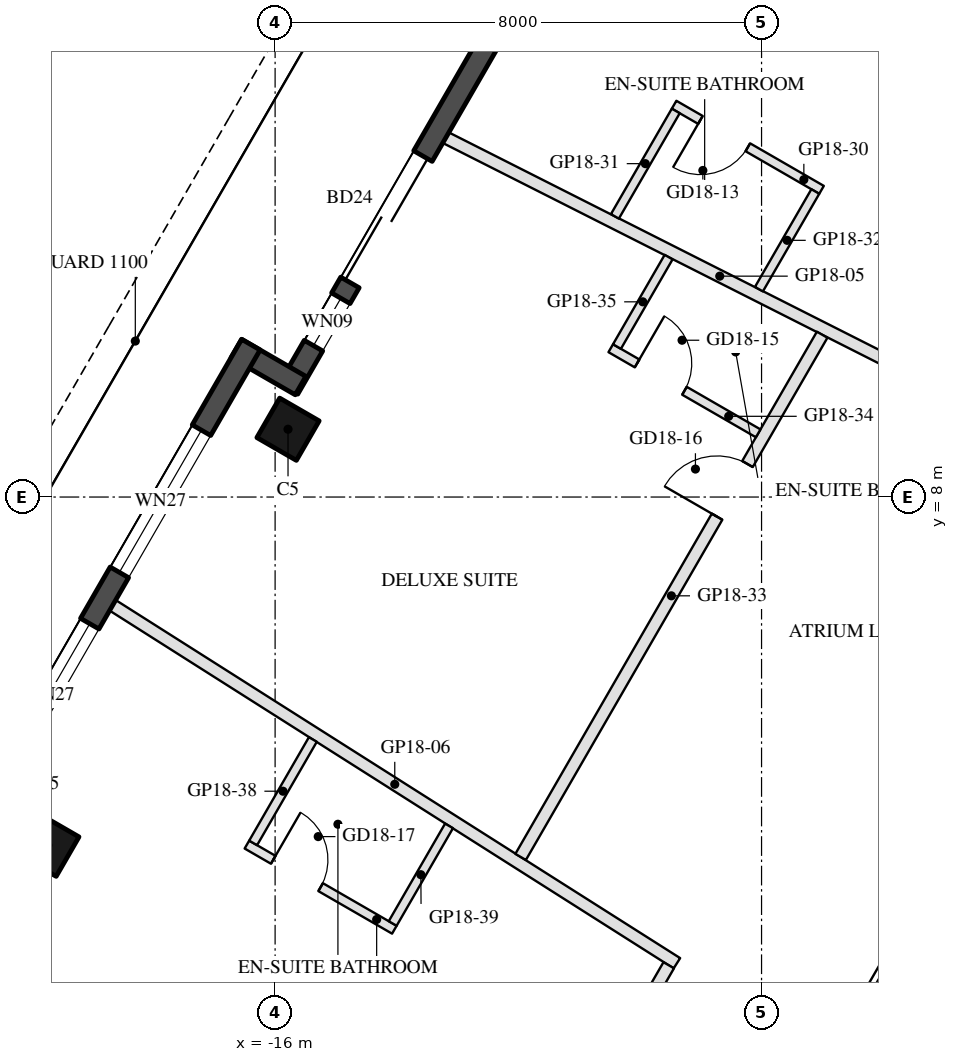
"""IFC4 building model, lengths in metres.
Left out: names, types, materials, properties, quantities, classifications, styles, units other than length and angle.
Written with IfcOpenShell. Run it as: python <this file> out.ifc"""

import sys

from ifc_helpers import new_model, si_unit, direction, frame, frame_2d, origin, origin_2d, place, context, subcontext, project, spatial, rectangle, hollow_rectangle, extrude, element, fill, save


model = new_model("IFC4")
c1 = context("Model", 3, precision=1e-05, world=origin(), true_north=direction((0.0, 1.0)))
c2 = subcontext(c1, "Body", "Model", "MODEL_VIEW")
j1 = project(units=[si_unit("LENGTHUNIT", "METRE"), si_unit("PLANEANGLEUNIT", "RADIAN")], contexts=[c1])
p1 = place(None, origin())
s1 = spatial("IfcSite", under=j1, at=p1, CompositionType="ELEMENT")
p2 = place(p1, origin())
s2 = spatial("IfcBuilding", under=s1, at=p2, CompositionType="ELEMENT")
p3 = place(p2, frame((0.0, 0.0, 191.0)))
s3 = spatial("IfcBuildingStorey", under=s2, at=p3, CompositionType="ELEMENT", Elevation=191.0)
for number, where, z_axis, x_axis in (
    (1, (-15.788, 9.115, 0.0), (0.0, 0.0, 1.0), (0.5, 0.866, 0.0)),
    (2, (-19.738, 2.273, 0.0), (0.0, 0.0, 1.0), (0.5, 0.866, 0.0)),
):
    element("IfcColumn", number, at=place(p3, frame(where, z_axis=z_axis, x_axis=x_axis)), inside=s3, PredefinedType="COLUMN", context=c2, shape_type="SweptSolid", body=[
        extrude(hollow_rectangle(XDim=0.75, YDim=0.75, WallThickness=0.035, at=origin_2d()), origin(), (0.0, 0.0, 1.0), 3.7),
    ])
p4 = place(p3, frame((-13.413, 16.029, 0.0), z_axis=(0.0, 0.0, 1.0), x_axis=(0.866005645448, -0.500034220881, 0.0)))
e3 = element("IfcWall", 3, at=p4, inside=s3, PredefinedType="SOLIDWALL", context=c2, shape_type="SweptSolid", body=[
    extrude(rectangle(XDim=1.22, YDim=0.35, at=frame_2d((0.61, 0.0))), origin(), (0.0, 0.0, 1.0), 3.55),
])
p5 = place(p3, frame((-12.409, 15.617, 0.0), z_axis=(0.0, 0.0, 1.0), x_axis=(-0.500003597184, -0.866023326939, 0.0)))
e4 = element("IfcWall", 4, at=p5, inside=s3, PredefinedType="SOLIDWALL", context=c2, shape_type="SweptSolid", body=[
    extrude(rectangle(XDim=6.74, YDim=0.35, at=frame_2d((3.37, 0.0))), origin(), (0.0, 0.0, 1.0), 3.55),
])
p6 = place(p5, frame((2.32, 0.0, 0.0)))
e5 = element("IfcOpeningElement", 5, at=p6, cuts=e4, PredefinedType="OPENING", context=c2, shape_type="SweptSolid", body=[
    extrude(rectangle(XDim=2.4, YDim=2.4, at=frame_2d((1.2, 1.2))), frame((0.0, 0.185, 0.0), z_axis=(0.0, -1.0, 0.0), x_axis=(1.0, 0.0, 0.0)), (0.0, 0.0, 1.0), 0.37),
])
p7 = place(p5, frame((5.02, 0.0, 0.3)))
e6 = element("IfcOpeningElement", 6, at=p7, cuts=e4, PredefinedType="OPENING", context=c2, shape_type="SweptSolid", body=[
    extrude(rectangle(XDim=0.9, YDim=2.65, at=frame_2d((0.45, 1.325))), frame((0.0, 0.185, 0.0), z_axis=(0.0, -1.0, 0.0), x_axis=(1.0, 0.0, 0.0)), (0.0, 0.0, 1.0), 0.37),
])
p8 = place(p3, frame((-15.581, 9.833, 0.0), z_axis=(0.0, 0.0, 1.0), x_axis=(-0.866055662726, 0.499947586314, 0.0)))
e7 = element("IfcWall", 7, at=p8, inside=s3, PredefinedType="SOLIDWALL", context=c2, shape_type="SweptSolid", body=[
    extrude(rectangle(XDim=1.22, YDim=0.35, at=frame_2d((0.61, 0.0))), origin(), (0.0, 0.0, 1.0), 3.55),
])
p9 = place(p3, frame((-16.398, 10.507, 0.0), z_axis=(0.0, 0.0, 1.0), x_axis=(-0.499999142773, -0.866025898704, 0.0)))
e8 = element("IfcWall", 8, at=p9, inside=s3, PredefinedType="SOLIDWALL", context=c2, shape_type="SweptSolid", body=[
    extrude(rectangle(XDim=9.7, YDim=0.35, at=frame_2d((4.85, 0.0))), origin(), (0.0, 0.0, 1.0), 3.55),
])
p10 = place(p9, frame((1.625, 0.0, 0.3)))
e9 = element("IfcOpeningElement", 9, at=p10, cuts=e8, PredefinedType="OPENING", context=c2, shape_type="SweptSolid", body=[
    extrude(rectangle(XDim=2.7, YDim=2.65, at=frame_2d((1.35, 1.325))), frame((0.0, 0.185, 0.0), z_axis=(0.0, -1.0, 0.0), x_axis=(1.0, 0.0, 0.0)), (0.0, 0.0, 1.0), 0.37),
])
p11 = place(p9, frame((5.3, 0.0, 0.3)))
e10 = element("IfcOpeningElement", 10, at=p11, cuts=e8, PredefinedType="OPENING", context=c2, shape_type="SweptSolid", body=[
    extrude(rectangle(XDim=2.7, YDim=2.65, at=frame_2d((1.35, 1.325))), frame((0.0, 0.185, 0.0), z_axis=(0.0, -1.0, 0.0), x_axis=(1.0, 0.0, 0.0)), (0.0, 0.0, 1.0), 0.37),
])
p12 = place(p3, frame((-13.192, 13.91, 0.0), z_axis=(0.0, 0.0, 1.0), x_axis=(0.892469554868, -0.451107629766, 0.0)))
e11 = element("IfcWall", 11, at=p12, inside=s3, PredefinedType="PARTITIONING", context=c2, shape_type="SweptSolid", body=[
    extrude(rectangle(XDim=10.096, YDim=0.2, at=frame_2d((5.048, 0.0))), origin(), (0.0, 0.0, 1.0), 3.06),
])
p13 = place(p3, frame((-18.672, 6.219, 0.0), z_axis=(0.0, 0.0, 1.0), x_axis=(0.844423533478, -0.535676111198, 0.0)))
e12 = element("IfcWall", 12, at=p13, inside=s3, PredefinedType="PARTITIONING", context=c2, shape_type="SweptSolid", body=[
    extrude(rectangle(XDim=10.99, YDim=0.2, at=frame_2d((5.495, 0.0))), origin(), (0.0, 0.0, 1.0), 2.95),
])
p14 = place(p3, frame((-7.013, 13.052, 0.0), z_axis=(0.0, 0.0, 1.0), x_axis=(-0.866034573852, 0.49998411664, 0.0)))
e13 = element("IfcWall", 13, at=p14, inside=s3, PredefinedType="PARTITIONING", context=c2, shape_type="SweptSolid", body=[
    extrude(rectangle(XDim=2.8, YDim=0.15, at=frame_2d((1.4, 0.0))), origin(), (0.0, 0.0, 1.0), 2.95),
])
p15 = place(p14, frame((1.4, 0.0, 0.0)))
e14 = element("IfcOpeningElement", 14, at=p15, cuts=e13, PredefinedType="OPENING", context=c2, shape_type="SweptSolid", body=[
    extrude(rectangle(XDim=0.9, YDim=2.1, at=frame_2d((0.45, 1.05))), frame((0.0, 0.085, 0.0), z_axis=(0.0, -1.0, 0.0), x_axis=(1.0, 0.0, 0.0)), (0.0, 0.0, 1.0), 0.17),
])
p16 = place(p3, frame((-9.411, 14.35, 0.0), z_axis=(0.0, 0.0, 1.0), x_axis=(-0.499982900776, -0.866035275801, 0.0)))
e15 = element("IfcWall", 15, at=p16, inside=s3, PredefinedType="PARTITIONING", context=c2, shape_type="SweptSolid", body=[
    extrude(rectangle(XDim=2.001, YDim=0.15, at=frame_2d((1.001, 0.0))), origin(), (0.0, 0.0, 1.0), 3.55),
])
p17 = place(p3, frame((-7.116, 13.025, 0.0), z_axis=(0.0, 0.0, 1.0), x_axis=(-0.4999770169, -0.866038672677, 0.0)))
e16 = element("IfcWall", 16, at=p17, inside=s3, PredefinedType="PARTITIONING", context=c2, shape_type="SweptSolid", body=[
    extrude(rectangle(XDim=1.854, YDim=0.15, at=frame_2d((0.927, 0.0))), origin(), (0.0, 0.0, 1.0), 3.55),
])
p18 = place(p3, frame((-11.962, 2.081, 0.0), z_axis=(0.0, 0.0, 1.0), x_axis=(0.500007290723, 0.866021194443, 0.0)))
e17 = element("IfcWall", 17, at=p18, inside=s3, PredefinedType="PARTITIONING", context=c2, shape_type="SweptSolid", body=[
    extrude(rectangle(XDim=9.917, YDim=0.2, at=frame_2d((4.958, 0.0))), origin(), (0.0, 0.0, 1.0), 2.95),
])
p19 = place(p18, frame((6.462, 0.0, 0.0)))
e18 = element("IfcOpeningElement", 18, at=p19, cuts=e17, PredefinedType="OPENING", context=c2, shape_type="SweptSolid", body=[
    extrude(rectangle(XDim=1.0, YDim=2.1, at=frame_2d((0.5, 1.05))), frame((0.0, 0.11, 0.0), z_axis=(0.0, -1.0, 0.0), x_axis=(1.0, 0.0, 0.0)), (0.0, 0.0, 1.0), 0.22),
])
p20 = place(p3, frame((-10.48, 10.448, 0.0), z_axis=(0.0, 0.0, 1.0), x_axis=(0.865996816683, -0.500049511043, 0.0)))
e19 = element("IfcWall", 19, at=p20, inside=s3, PredefinedType="PARTITIONING", context=c2, shape_type="SweptSolid", body=[
    extrude(rectangle(XDim=2.8, YDim=0.15, at=frame_2d((1.4, 0.0))), origin(), (0.0, 0.0, 1.0), 2.95),
])
p21 = place(p20, frame((0.5, 0.0, 0.0)))
e20 = element("IfcOpeningElement", 20, at=p21, cuts=e19, PredefinedType="OPENING", context=c2, shape_type="SweptSolid", body=[
    extrude(rectangle(XDim=0.9, YDim=2.1, at=frame_2d((0.45, 1.05))), frame((0.0, 0.085, 0.0), z_axis=(0.0, -1.0, 0.0), x_axis=(1.0, 0.0, 0.0)), (0.0, 0.0, 1.0), 0.17),
])
p22 = place(p3, frame((-9.529, 11.946, 0.0), z_axis=(0.0, 0.0, 1.0), x_axis=(-0.499942281444, -0.866058725044, 0.0)))
e21 = element("IfcWall", 21, at=p22, inside=s3, PredefinedType="PARTITIONING", context=c2, shape_type="SweptSolid", body=[
    extrude(rectangle(XDim=1.698, YDim=0.15, at=frame_2d((0.849, 0.0))), origin(), (0.0, 0.0, 1.0), 2.95),
])
p23 = place(p3, frame((-12.269, -4.45, 0.0), z_axis=(0.0, 0.0, 1.0), x_axis=(0.500026884667, 0.866009881359, 0.0)))
e22 = element("IfcWall", 22, at=p23, inside=s3, PredefinedType="PARTITIONING", context=c2, shape_type="SweptSolid", body=[
    extrude(rectangle(XDim=5.484, YDim=0.2, at=frame_2d((2.742, 0.0))), origin(), (0.0, 0.0, 1.0), 2.95),
])
p24 = place(p23, frame((2.242, 0.0, 0.0)))
e23 = element("IfcOpeningElement", 23, at=p24, cuts=e22, PredefinedType="OPENING", context=c2, shape_type="SweptSolid", body=[
    extrude(rectangle(XDim=1.0, YDim=2.1, at=frame_2d((0.5, 1.05))), frame((0.0, 0.11, 0.0), z_axis=(0.0, -1.0, 0.0), x_axis=(1.0, 0.0, 0.0)), (0.0, 0.0, 1.0), 0.22),
])
p25 = place(p3, frame((-16.464, 2.284, 0.0), z_axis=(0.0, 0.0, 1.0), x_axis=(0.866018616679, -0.500011755427, 0.0)))
e24 = element("IfcWall", 24, at=p25, inside=s3, PredefinedType="PARTITIONING", context=c2, shape_type="SweptSolid", body=[
    extrude(rectangle(XDim=2.8, YDim=0.15, at=frame_2d((1.4, 0.0))), origin(), (0.0, 0.0, 1.0), 3.55),
])
p26 = place(p25, frame((0.5, 0.0, 0.0)))
e25 = element("IfcOpeningElement", 25, at=p26, cuts=e24, PredefinedType="OPENING", context=c2, shape_type="SweptSolid", body=[
    extrude(rectangle(XDim=0.9, YDim=2.1, at=frame_2d((0.45, 1.05))), frame((0.0, 0.085, 0.0), z_axis=(0.0, -1.0, 0.0), x_axis=(1.0, 0.0, 0.0)), (0.0, 0.0, 1.0), 0.17),
])
p27 = place(p3, frame((-15.379, 4.012, 0.0), z_axis=(0.0, 0.0, 1.0), x_axis=(-0.500016598995, -0.866015820138, 0.0)))
e26 = element("IfcWall", 26, at=p27, inside=s3, PredefinedType="PARTITIONING", context=c2, shape_type="SweptSolid", body=[
    extrude(rectangle(XDim=1.964, YDim=0.15, at=frame_2d((0.982, 0.0))), origin(), (0.0, 0.0, 1.0), 3.55),
])
p28 = place(p3, frame((-13.14, 2.591, 0.0), z_axis=(0.0, 0.0, 1.0), x_axis=(-0.499950530793, -0.86605396296, 0.0)))
e27 = element("IfcWall", 27, at=p28, inside=s3, PredefinedType="PARTITIONING", context=c2, shape_type="SweptSolid", body=[
    extrude(rectangle(XDim=1.853, YDim=0.15, at=frame_2d((0.927, 0.0))), origin(), (0.0, 0.0, 1.0), 3.55),
])
p29 = place(p6, frame((2.4, 0.0, 0.0), z_axis=(0.0, 0.0, 1.0), x_axis=(-1.0, 0.0, 0.0)))
e28 = element("IfcDoor", 28, at=p29, inside=s3, OperationType="SLIDING_TO_LEFT", PredefinedType="DOOR", context=c2, shape_type="SweptSolid", body=[
    extrude(rectangle(XDim=2.4, YDim=2.4, at=frame_2d((1.2, 1.2))), frame((0.0, 0.025, 0.0), z_axis=(0.0, -1.0, 0.0), x_axis=(1.0, 0.0, 0.0)), (0.0, 0.0, 1.0), 0.05),
])
fill(e5, e28)
p30 = place(p7, origin())
e29 = element("IfcWindow", 29, at=p30, inside=s3, PartitioningType="SINGLE_PANEL", PredefinedType="WINDOW", context=c2, shape_type="SweptSolid", body=[
    extrude(rectangle(XDim=0.9, YDim=2.65, at=frame_2d((0.45, 1.325))), frame((0.0, 0.03, 0.0), z_axis=(0.0, -1.0, 0.0), x_axis=(1.0, 0.0, 0.0)), (0.0, 0.0, 1.0), 0.06),
])
fill(e6, e29)
p31 = place(p10, origin())
e30 = element("IfcWindow", 30, at=p31, inside=s3, PartitioningType="SINGLE_PANEL", PredefinedType="WINDOW", context=c2, shape_type="SweptSolid", body=[
    extrude(rectangle(XDim=2.7, YDim=2.65, at=frame_2d((1.35, 1.325))), frame((0.0, 0.03, 0.0), z_axis=(0.0, -1.0, 0.0), x_axis=(1.0, 0.0, 0.0)), (0.0, 0.0, 1.0), 0.06),
])
fill(e9, e30)
p32 = place(p11, origin())
e31 = element("IfcWindow", 31, at=p32, inside=s3, PartitioningType="SINGLE_PANEL", PredefinedType="WINDOW", context=c2, shape_type="SweptSolid", body=[
    extrude(rectangle(XDim=2.7, YDim=2.65, at=frame_2d((1.35, 1.325))), frame((0.0, 0.03, 0.0), z_axis=(0.0, -1.0, 0.0), x_axis=(1.0, 0.0, 0.0)), (0.0, 0.0, 1.0), 0.06),
])
fill(e10, e31)
p33 = place(p15, origin())
e32 = element("IfcDoor", 32, at=p33, inside=s3, OperationType="SINGLE_SWING_RIGHT", PredefinedType="DOOR", context=c2, shape_type="SweptSolid", body=[
    extrude(rectangle(XDim=0.9, YDim=2.1, at=frame_2d((0.45, 1.05))), frame((0.0, 0.025, 0.0), z_axis=(0.0, -1.0, 0.0), x_axis=(1.0, 0.0, 0.0)), (0.0, 0.0, 1.0), 0.05),
])
fill(e14, e32)
p34 = place(p21, origin())
e33 = element("IfcDoor", 33, at=p34, inside=s3, OperationType="SINGLE_SWING_LEFT", PredefinedType="DOOR", context=c2, shape_type="SweptSolid", body=[
    extrude(rectangle(XDim=0.9, YDim=2.1, at=frame_2d((0.45, 1.05))), frame((0.0, 0.025, 0.0), z_axis=(0.0, -1.0, 0.0), x_axis=(1.0, 0.0, 0.0)), (0.0, 0.0, 1.0), 0.05),
])
fill(e20, e33)
p35 = place(p19, origin())
e34 = element("IfcDoor", 34, at=p35, inside=s3, OperationType="SINGLE_SWING_LEFT", PredefinedType="DOOR", context=c2, shape_type="SweptSolid", body=[
    extrude(rectangle(XDim=1.0, YDim=2.1, at=frame_2d((0.5, 1.05))), frame((0.0, 0.025, 0.0), z_axis=(0.0, -1.0, 0.0), x_axis=(1.0, 0.0, 0.0)), (0.0, 0.0, 1.0), 0.05),
])
fill(e18, e34)
p36 = place(p26, origin())
e35 = element("IfcDoor", 35, at=p36, inside=s3, OperationType="SINGLE_SWING_LEFT", PredefinedType="DOOR", context=c2, shape_type="SweptSolid", body=[
    extrude(rectangle(XDim=0.9, YDim=2.1, at=frame_2d((0.45, 1.05))), frame((0.0, 0.025, 0.0), z_axis=(0.0, -1.0, 0.0), x_axis=(1.0, 0.0, 0.0)), (0.0, 0.0, 1.0), 0.05),
])
fill(e25, e35)
save(model, sys.argv[1])
